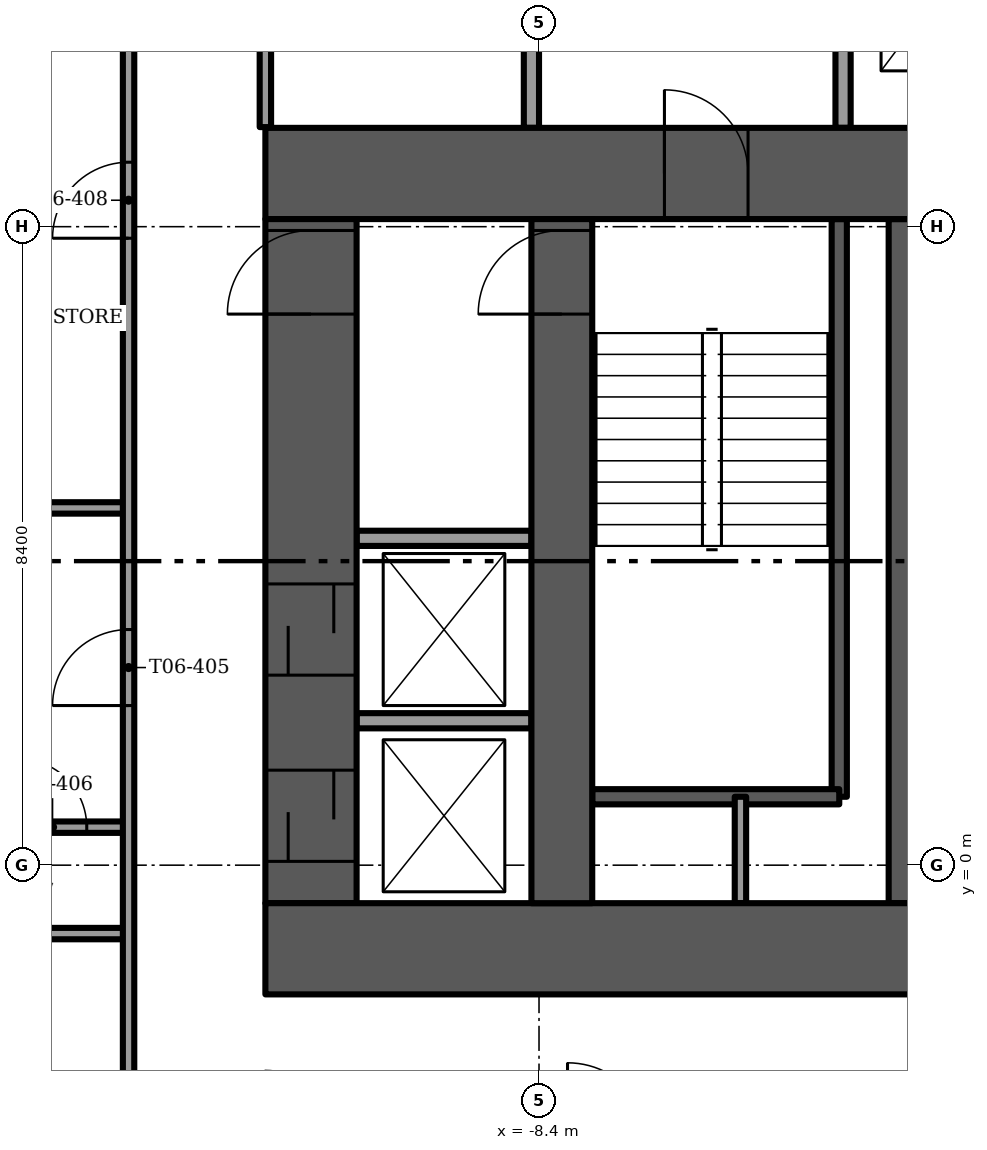
"""IFC4 building model, lengths in metres.
Left out: names, types, materials, properties, quantities, classifications, styles, units other than length and angle.
Written with IfcOpenShell. Run it as: python <this file> out.ifc"""

import sys

from ifc_helpers import new_model, si_unit, direction, frame, frame_2d, origin, place, context, subcontext, project, spatial, rectangle, extrude, element, fill, save


model = new_model("IFC4")
c1 = context("Model", 3, precision=1e-05, world=origin(), true_north=direction((0.0, 1.0)))
c2 = subcontext(c1, "Body", "Model", "MODEL_VIEW")
j1 = project(units=[si_unit("LENGTHUNIT", "METRE"), si_unit("PLANEANGLEUNIT", "RADIAN")], contexts=[c1])
p1 = place(None, origin())
s1 = spatial("IfcSite", under=j1, at=p1, CompositionType="ELEMENT")
p2 = place(p1, origin())
s2 = spatial("IfcBuilding", under=s1, at=p2, CompositionType="ELEMENT")
p3 = place(p2, frame((0.0, 0.0, 28.0)))
s3 = spatial("IfcBuildingStorey", under=s2, at=p3, CompositionType="ELEMENT", Elevation=28.0)
p4 = place(p3, frame((-12.0, -1.1, -0.3), z_axis=(0.0, 0.0, 1.0), x_axis=(1.0, 0.0, 0.0)))
e1 = element("IfcWall", 1, at=p4, inside=s3, PredefinedType="SHEAR", context=c2, shape_type="SweptSolid", body=[
    extrude(rectangle(XDim=24.0, YDim=1.2, at=frame_2d((12.0, 0.0))), origin(), (0.0, 0.0, 1.0), 3.75),
])
p5 = place(p4, frame((11.2, 0.0, 0.0)))
e2 = element("IfcOpeningElement", 2, at=p5, cuts=e1, PredefinedType="OPENING", context=c2, shape_type="SweptSolid", body=[
    extrude(rectangle(XDim=1.6, YDim=2.1, at=frame_2d((0.8, 1.05))), frame((0.0, 0.6, 0.0), z_axis=(0.0, -1.0, 0.0), x_axis=(1.0, 0.0, 0.0)), (0.0, 0.0, 1.0), 1.2),
])
p6 = place(p3, frame((-12.0, 9.1, -0.3), z_axis=(0.0, 0.0, 1.0), x_axis=(1.0, 0.0, 0.0)))
e3 = element("IfcWall", 3, at=p6, inside=s3, PredefinedType="SHEAR", context=c2, shape_type="SweptSolid", body=[
    extrude(rectangle(XDim=24.0, YDim=1.2, at=frame_2d((12.0, 0.0))), origin(), (0.0, 0.0, 1.0), 3.75),
])
p7 = place(p6, frame((11.2, 0.0, 0.0)))
e4 = element("IfcOpeningElement", 4, at=p7, cuts=e3, PredefinedType="OPENING", context=c2, shape_type="SweptSolid", body=[
    extrude(rectangle(XDim=1.6, YDim=2.1, at=frame_2d((0.8, 1.05))), frame((0.0, 0.6, 0.0), z_axis=(0.0, -1.0, 0.0), x_axis=(1.0, 0.0, 0.0)), (0.0, 0.0, 1.0), 1.2),
])
p8 = place(p6, frame((5.25, 0.0, 0.0)))
e5 = element("IfcOpeningElement", 5, at=p8, cuts=e3, PredefinedType="OPENING", context=c2, shape_type="SweptSolid", body=[
    extrude(rectangle(XDim=1.1, YDim=2.1, at=frame_2d((0.55, 1.05))), frame((0.0, 0.6, 0.0), z_axis=(0.0, -1.0, 0.0), x_axis=(1.0, 0.0, 0.0)), (0.0, 0.0, 1.0), 1.2),
])
p9 = place(p6, frame((17.65, 0.0, 0.0)))
e6 = element("IfcOpeningElement", 6, at=p9, cuts=e3, PredefinedType="OPENING", context=c2, shape_type="SweptSolid", body=[
    extrude(rectangle(XDim=1.1, YDim=2.1, at=frame_2d((0.55, 1.05))), frame((0.0, 0.6, 0.0), z_axis=(0.0, -1.0, 0.0), x_axis=(1.0, 0.0, 0.0)), (0.0, 0.0, 1.0), 1.2),
])
p10 = place(p3, frame((-8.1, -0.5, -0.3), z_axis=(0.0, 0.0, 1.0), x_axis=(0.0, 1.0, 0.0)))
e7 = element("IfcWall", 7, at=p10, inside=s3, PredefinedType="SHEAR", context=c2, shape_type="SweptSolid", body=[
    extrude(rectangle(XDim=9.0, YDim=0.8, at=frame_2d((4.5, 0.0))), origin(), (0.0, 0.0, 1.0), 3.75),
])
p11 = place(p10, frame((7.75, 0.0, 0.0)))
e8 = element("IfcOpeningElement", 8, at=p11, cuts=e7, PredefinedType="OPENING", context=c2, shape_type="SweptSolid", body=[
    extrude(rectangle(XDim=1.1, YDim=2.1, at=frame_2d((0.55, 1.05))), frame((0.0, 0.4, 0.0), z_axis=(0.0, -1.0, 0.0), x_axis=(1.0, 0.0, 0.0)), (0.0, 0.0, 1.0), 0.8),
])
p12 = place(p3, frame((-3.6, -0.5, -0.3), z_axis=(0.0, 0.0, 1.0), x_axis=(0.0, 1.0, 0.0)))
e9 = element("IfcWall", 9, at=p12, inside=s3, PredefinedType="SHEAR", context=c2, shape_type="SweptSolid", body=[
    extrude(rectangle(XDim=9.0, YDim=0.4, at=frame_2d((4.5, 0.0))), origin(), (0.0, 0.0, 1.0), 3.75),
])
p13 = place(p3, frame((-11.4, -0.5, -0.3), z_axis=(0.0, 0.0, 1.0), x_axis=(0.0, 1.0, 0.0)))
e10 = element("IfcWall", 10, at=p13, inside=s3, PredefinedType="SHEAR", context=c2, shape_type="SweptSolid", body=[
    extrude(rectangle(XDim=9.0, YDim=1.2, at=frame_2d((4.5, 0.0))), origin(), (0.0, 0.0, 1.0), 3.75),
])
p14 = place(p13, frame((7.75, 0.0, 0.0)))
e11 = element("IfcOpeningElement", 11, at=p14, cuts=e10, PredefinedType="OPENING", context=c2, shape_type="SweptSolid", body=[
    extrude(rectangle(XDim=1.1, YDim=2.1, at=frame_2d((0.55, 1.05))), frame((0.0, 0.6, 0.0), z_axis=(0.0, -1.0, 0.0), x_axis=(1.0, 0.0, 0.0)), (0.0, 0.0, 1.0), 1.2),
])
p15 = place(p13, frame((0.55, 0.0, 0.0)))
e12 = element("IfcOpeningElement", 12, at=p15, cuts=e10, PredefinedType="OPENING", context=c2, shape_type="SweptSolid", body=[
    extrude(rectangle(XDim=1.2, YDim=2.1, at=frame_2d((0.6, 1.05))), frame((0.0, 0.6, 0.0), z_axis=(0.0, -1.0, 0.0), x_axis=(1.0, 0.0, 0.0)), (0.0, 0.0, 1.0), 1.2),
])
p16 = place(p13, frame((3.0, 0.0, 0.0)))
e13 = element("IfcOpeningElement", 13, at=p16, cuts=e10, PredefinedType="OPENING", context=c2, shape_type="SweptSolid", body=[
    extrude(rectangle(XDim=1.2, YDim=2.1, at=frame_2d((0.6, 1.05))), frame((0.0, 0.6, 0.0), z_axis=(0.0, -1.0, 0.0), x_axis=(1.0, 0.0, 0.0)), (0.0, 0.0, 1.0), 1.2),
])
p17 = place(p3, frame((-9.56, 20.292, 0.0), z_axis=(0.0, 0.0, 1.0), x_axis=(-0.500000010132, -0.866025397935, 0.0)))
e14 = element("IfcWall", 14, at=p17, inside=s3, PredefinedType="SOLIDWALL", context=c2, shape_type="SweptSolid", body=[
    extrude(rectangle(XDim=22.817, YDim=0.15, at=frame_2d((11.408, 0.0))), origin(), (0.0, 0.0, 1.0), 3.45),
])
p18 = place(p17, frame((2.594, 0.0, 0.15)))
e15 = element("IfcOpeningElement", 15, at=p18, cuts=e14, PredefinedType="OPENING", context=c2, shape_type="SweptSolid", body=[
    extrude(rectangle(XDim=0.9, YDim=2.85, at=frame_2d((0.45, 1.425))), frame((0.0, 0.075, 0.0), z_axis=(0.0, -1.0, 0.0), x_axis=(1.0, 0.0, 0.0)), (0.0, 0.0, 1.0), 0.15),
])
p19 = place(p17, frame((3.825, 0.0, 0.15)))
e16 = element("IfcOpeningElement", 16, at=p19, cuts=e14, PredefinedType="OPENING", context=c2, shape_type="SweptSolid", body=[
    extrude(rectangle(XDim=1.5, YDim=2.85, at=frame_2d((0.75, 1.425))), frame((0.0, 0.075, 0.0), z_axis=(0.0, -1.0, 0.0), x_axis=(1.0, 0.0, 0.0)), (0.0, 0.0, 1.0), 0.15),
])
p20 = place(p17, frame((6.794, 0.0, 0.15)))
e17 = element("IfcOpeningElement", 17, at=p20, cuts=e14, PredefinedType="OPENING", context=c2, shape_type="SweptSolid", body=[
    extrude(rectangle(XDim=0.9, YDim=2.85, at=frame_2d((0.45, 1.425))), frame((0.0, 0.075, 0.0), z_axis=(0.0, -1.0, 0.0), x_axis=(1.0, 0.0, 0.0)), (0.0, 0.0, 1.0), 0.15),
])
p21 = place(p17, frame((8.894, 0.0, 0.15)))
e18 = element("IfcOpeningElement", 18, at=p21, cuts=e14, PredefinedType="OPENING", context=c2, shape_type="SweptSolid", body=[
    extrude(rectangle(XDim=1.5, YDim=2.85, at=frame_2d((0.75, 1.425))), frame((0.0, 0.075, 0.0), z_axis=(0.0, -1.0, 0.0), x_axis=(1.0, 0.0, 0.0)), (0.0, 0.0, 1.0), 0.15),
])
p22 = place(p17, frame((10.994, 0.0, 0.15)))
e19 = element("IfcOpeningElement", 19, at=p22, cuts=e14, PredefinedType="OPENING", context=c2, shape_type="SweptSolid", body=[
    extrude(rectangle(XDim=1.8, YDim=2.85, at=frame_2d((0.9, 1.425))), frame((0.0, 0.075, 0.0), z_axis=(0.0, -1.0, 0.0), x_axis=(1.0, 0.0, 0.0)), (0.0, 0.0, 1.0), 0.15),
])
p23 = place(p17, frame((13.094, 0.0, 0.15)))
e20 = element("IfcOpeningElement", 20, at=p23, cuts=e14, PredefinedType="OPENING", context=c2, shape_type="SweptSolid", body=[
    extrude(rectangle(XDim=1.5, YDim=2.85, at=frame_2d((0.75, 1.425))), frame((0.0, 0.075, 0.0), z_axis=(0.0, -1.0, 0.0), x_axis=(1.0, 0.0, 0.0)), (0.0, 0.0, 1.0), 0.15),
])
p24 = place(p17, frame((15.631, 0.0, 0.0)))
e21 = element("IfcOpeningElement", 21, at=p24, cuts=e14, PredefinedType="OPENING", context=c2, shape_type="SweptSolid", body=[
    extrude(rectangle(XDim=1.5, YDim=2.4, at=frame_2d((0.75, 1.2))), frame((0.0, 0.075, 0.0), z_axis=(0.0, -1.0, 0.0), x_axis=(1.0, 0.0, 0.0)), (0.0, 0.0, 1.0), 0.15),
])
p25 = place(p17, frame((0.44, 0.0, 0.15)))
e22 = element("IfcOpeningElement", 22, at=p25, cuts=e14, PredefinedType="OPENING", context=c2, shape_type="SweptSolid", body=[
    extrude(rectangle(XDim=0.9, YDim=2.73, at=frame_2d((0.45, 1.365))), frame((0.0, 0.075, 0.0), z_axis=(0.0, -1.0, 0.0), x_axis=(1.0, 0.0, 0.0)), (0.0, 0.0, 1.0), 0.15),
])
p26 = place(p17, frame((20.024, 0.0, 0.15)))
e23 = element("IfcOpeningElement", 23, at=p26, cuts=e14, PredefinedType="OPENING", context=c2, shape_type="SweptSolid", body=[
    extrude(rectangle(XDim=1.8, YDim=2.73, at=frame_2d((0.9, 1.365))), frame((0.0, 0.075, 0.0), z_axis=(0.0, -1.0, 0.0), x_axis=(1.0, 0.0, 0.0)), (0.0, 0.0, 1.0), 0.15),
])
p27 = place(p3, frame((-20.968, -0.532, 0.0), z_axis=(0.0, 0.0, 1.0), x_axis=(0.500003237297, -0.866023534722, 0.0)))
e24 = element("IfcWall", 24, at=p27, inside=s3, PredefinedType="SOLIDWALL", context=c2, shape_type="SweptSolid", body=[
    extrude(rectangle(XDim=20.046, YDim=0.15, at=frame_2d((10.023, 0.0))), origin(), (0.0, 0.0, 1.0), 3.45),
])
p28 = place(p27, frame((1.923, 0.0, 0.15)))
e25 = element("IfcOpeningElement", 25, at=p28, cuts=e24, PredefinedType="OPENING", context=c2, shape_type="SweptSolid", body=[
    extrude(rectangle(XDim=0.9, YDim=2.85, at=frame_2d((0.45, 1.425))), frame((0.0, 0.075, 0.0), z_axis=(0.0, -1.0, 0.0), x_axis=(1.0, 0.0, 0.0)), (0.0, 0.0, 1.0), 0.15),
])
p29 = place(p27, frame((6.123, 0.0, 0.15)))
e26 = element("IfcOpeningElement", 26, at=p29, cuts=e24, PredefinedType="OPENING", context=c2, shape_type="SweptSolid", body=[
    extrude(rectangle(XDim=1.8, YDim=2.85, at=frame_2d((0.9, 1.425))), frame((0.0, 0.075, 0.0), z_axis=(0.0, -1.0, 0.0), x_axis=(1.0, 0.0, 0.0)), (0.0, 0.0, 1.0), 0.15),
])
p30 = place(p27, frame((8.223, 0.0, 0.0)))
e27 = element("IfcOpeningElement", 27, at=p30, cuts=e24, PredefinedType="OPENING", context=c2, shape_type="SweptSolid", body=[
    extrude(rectangle(XDim=1.5, YDim=2.4, at=frame_2d((0.75, 1.2))), frame((0.0, 0.075, 0.0), z_axis=(0.0, -1.0, 0.0), x_axis=(1.0, 0.0, 0.0)), (0.0, 0.0, 1.0), 0.15),
])
p31 = place(p27, frame((10.323, 0.0, 0.15)))
e28 = element("IfcOpeningElement", 28, at=p31, cuts=e24, PredefinedType="OPENING", context=c2, shape_type="SweptSolid", body=[
    extrude(rectangle(XDim=1.8, YDim=2.85, at=frame_2d((0.9, 1.425))), frame((0.0, 0.075, 0.0), z_axis=(0.0, -1.0, 0.0), x_axis=(1.0, 0.0, 0.0)), (0.0, 0.0, 1.0), 0.15),
])
p32 = place(p27, frame((12.423, 0.0, 0.0)))
e29 = element("IfcOpeningElement", 29, at=p32, cuts=e24, PredefinedType="OPENING", context=c2, shape_type="SweptSolid", body=[
    extrude(rectangle(XDim=1.5, YDim=2.4, at=frame_2d((0.75, 1.2))), frame((0.0, 0.075, 0.0), z_axis=(0.0, -1.0, 0.0), x_axis=(1.0, 0.0, 0.0)), (0.0, 0.0, 1.0), 0.15),
])
p33 = place(p27, frame((14.523, 0.0, 0.15)))
e30 = element("IfcOpeningElement", 30, at=p33, cuts=e24, PredefinedType="OPENING", context=c2, shape_type="SweptSolid", body=[
    extrude(rectangle(XDim=1.8, YDim=2.85, at=frame_2d((0.9, 1.425))), frame((0.0, 0.075, 0.0), z_axis=(0.0, -1.0, 0.0), x_axis=(1.0, 0.0, 0.0)), (0.0, 0.0, 1.0), 0.15),
])
p34 = place(p27, frame((16.623, 0.0, 0.0)))
e31 = element("IfcOpeningElement", 31, at=p34, cuts=e24, PredefinedType="OPENING", context=c2, shape_type="SweptSolid", body=[
    extrude(rectangle(XDim=1.5, YDim=2.4, at=frame_2d((0.75, 1.2))), frame((0.0, 0.075, 0.0), z_axis=(0.0, -1.0, 0.0), x_axis=(1.0, 0.0, 0.0)), (0.0, 0.0, 1.0), 0.15),
])
p35 = place(p27, frame((0.311, 0.0, 0.15)))
e32 = element("IfcOpeningElement", 32, at=p35, cuts=e24, PredefinedType="OPENING", context=c2, shape_type="SweptSolid", body=[
    extrude(rectangle(XDim=0.9, YDim=2.73, at=frame_2d((0.45, 1.365))), frame((0.0, 0.075, 0.0), z_axis=(0.0, -1.0, 0.0), x_axis=(1.0, 0.0, 0.0)), (0.0, 0.0, 1.0), 0.15),
])
p36 = place(p27, frame((18.834, 0.0, 0.15)))
e33 = element("IfcOpeningElement", 33, at=p36, cuts=e24, PredefinedType="OPENING", context=c2, shape_type="SweptSolid", body=[
    extrude(rectangle(XDim=0.9, YDim=2.73, at=frame_2d((0.45, 1.365))), frame((0.0, 0.075, 0.0), z_axis=(0.0, -1.0, 0.0), x_axis=(1.0, 0.0, 0.0)), (0.0, 0.0, 1.0), 0.15),
])
p37 = place(p3, frame((-4.45, 0.9, -0.3), z_axis=(0.0, 0.0, 1.0), x_axis=(0.0, 1.0, 0.0)))
e34 = element("IfcWall", 34, at=p37, inside=s3, PredefinedType="SOLIDWALL", context=c2, shape_type="SweptSolid", body=[
    extrude(rectangle(XDim=7.6, YDim=0.2, at=frame_2d((3.8, 0.0))), origin(), (0.0, 0.0, 1.0), 3.75),
])
p38 = place(p3, frame((-7.7, 0.9, -0.3), z_axis=(0.0, 0.0, 1.0), x_axis=(1.0, 0.0, 0.0)))
e35 = element("IfcWall", 35, at=p38, inside=s3, PredefinedType="SOLIDWALL", context=c2, shape_type="SweptSolid", body=[
    extrude(rectangle(XDim=3.25, YDim=0.2, at=frame_2d((1.625, 0.0))), origin(), (0.0, 0.0, 1.0), 3.75),
])
p39 = place(p3, frame((-5.75, -0.5, 0.0), z_axis=(0.0, 0.0, 1.0), x_axis=(0.0, 1.0, 0.0)))
e36 = element("IfcWall", 36, at=p39, inside=s3, PredefinedType="PARTITIONING", context=c2, shape_type="SweptSolid", body=[
    extrude(rectangle(XDim=1.4, YDim=0.15, at=frame_2d((0.7, 0.0))), origin(), (0.0, 0.0, 1.0), 3.45),
])
p40 = place(p3, frame((-8.5, 9.7, 0.0), z_axis=(0.0, 0.0, 1.0), x_axis=(0.0, 1.0, 0.0)))
e37 = element("IfcWall", 37, at=p40, inside=s3, PredefinedType="PARTITIONING", context=c2, shape_type="SweptSolid", body=[
    extrude(rectangle(XDim=3.9, YDim=0.2, at=frame_2d((1.95, 0.0))), origin(), (0.0, 0.0, 1.0), 3.45),
])
p41 = place(p40, frame((1.35, 0.0, 0.0)))
e38 = element("IfcOpeningElement", 38, at=p41, cuts=e37, PredefinedType="OPENING", context=c2, shape_type="SweptSolid", body=[
    extrude(rectangle(XDim=1.2, YDim=2.1, at=frame_2d((0.6, 1.05))), frame((0.0, 0.1, 0.0), z_axis=(0.0, -1.0, 0.0), x_axis=(1.0, 0.0, 0.0)), (0.0, 0.0, 1.0), 0.2),
])
p42 = place(p3, frame((-4.4, 9.7, 0.0), z_axis=(0.0, 0.0, 1.0), x_axis=(0.0, 1.0, 0.0)))
e39 = element("IfcWall", 39, at=p42, inside=s3, PredefinedType="PARTITIONING", context=c2, shape_type="SweptSolid", body=[
    extrude(rectangle(XDim=3.9, YDim=0.2, at=frame_2d((1.95, 0.0))), origin(), (0.0, 0.0, 1.0), 3.45),
])
p43 = place(p42, frame((1.35, 0.0, 0.0)))
e40 = element("IfcOpeningElement", 40, at=p43, cuts=e39, PredefinedType="OPENING", context=c2, shape_type="SweptSolid", body=[
    extrude(rectangle(XDim=1.2, YDim=2.1, at=frame_2d((0.6, 1.05))), frame((0.0, 0.1, 0.0), z_axis=(0.0, -1.0, 0.0), x_axis=(1.0, 0.0, 0.0)), (0.0, 0.0, 1.0), 0.2),
])
for number, where, z_axis, x_axis in (
    (41, (-10.8, 1.9, 0.0), (0.0, 0.0, 1.0), (1.0, 0.0, 0.0)),
    (42, (-10.8, 4.3, 0.0), (0.0, 0.0, 1.0), (1.0, 0.0, 0.0)),
):
    element("IfcWall", number, at=place(p3, frame(where, z_axis=z_axis, x_axis=x_axis)), inside=s3, PredefinedType="PARTITIONING", context=c2, shape_type="SweptSolid", body=[
        extrude(rectangle(XDim=2.3, YDim=0.2, at=frame_2d((1.15, 0.0))), origin(), (0.0, 0.0, 1.0), 3.45),
    ])
p44 = place(p3, frame((-16.8, -0.9, 0.0), z_axis=(0.0, 0.0, 1.0), x_axis=(1.0, 0.0, 0.0)))
e43 = element("IfcWall", 43, at=p44, inside=s3, PredefinedType="PARTITIONING", context=c2, shape_type="SweptSolid", body=[
    extrude(rectangle(XDim=3.0, YDim=0.15, at=frame_2d((1.5, 0.0))), origin(), (0.0, 0.0, 1.0), 3.45),
])
p45 = place(p44, frame((1.1, 0.0, 0.0)))
e44 = element("IfcOpeningElement", 44, at=p45, cuts=e43, PredefinedType="OPENING", context=c2, shape_type="SweptSolid", body=[
    extrude(rectangle(XDim=0.8, YDim=2.1, at=frame_2d((0.4, 1.05))), frame((0.0, 0.075, 0.0), z_axis=(0.0, -1.0, 0.0), x_axis=(1.0, 0.0, 0.0)), (0.0, 0.0, 1.0), 0.15),
])
p46 = place(p3, frame((-20.986, 0.5, 0.0), z_axis=(0.0, 0.0, 1.0), x_axis=(1.0, 0.0, 0.0)))
e45 = element("IfcWall", 45, at=p46, inside=s3, PredefinedType="PARTITIONING", context=c2, shape_type="SweptSolid", body=[
    extrude(rectangle(XDim=7.186, YDim=0.15, at=frame_2d((3.593, 0.0))), origin(), (0.0, 0.0, 1.0), 3.45),
])
p47 = place(p46, frame((5.736, 0.0, 0.0)))
e46 = element("IfcOpeningElement", 46, at=p47, cuts=e45, PredefinedType="OPENING", context=c2, shape_type="SweptSolid", body=[
    extrude(rectangle(XDim=0.9, YDim=2.1, at=frame_2d((0.45, 1.05))), frame((0.0, 0.075, 0.0), z_axis=(0.0, -1.0, 0.0), x_axis=(1.0, 0.0, 0.0)), (0.0, 0.0, 1.0), 0.15),
])
p48 = place(p3, frame((-18.614, 4.7, 0.0), z_axis=(0.0, 0.0, 1.0), x_axis=(1.0, 0.0, 0.0)))
e47 = element("IfcWall", 47, at=p48, inside=s3, PredefinedType="PARTITIONING", context=c2, shape_type="SweptSolid", body=[
    extrude(rectangle(XDim=4.814, YDim=0.15, at=frame_2d((2.407, 0.0))), origin(), (0.0, 0.0, 1.0), 3.45),
])
p49 = place(p3, frame((-12.0, 9.71, 0.0), z_axis=(0.0, 0.0, 1.0), x_axis=(0.0, 1.0, 0.0)))
e48 = element("IfcWall", 48, at=p49, inside=s3, PredefinedType="PARTITIONING", context=c2, shape_type="SweptSolid", body=[
    extrude(rectangle(XDim=3.89, YDim=0.15, at=frame_2d((1.945, 0.0))), origin(), (0.0, 0.0, 1.0), 3.45),
])
p50 = place(p3, frame((-13.8, -3.7, 0.0), z_axis=(0.0, 0.0, 1.0), x_axis=(0.0, 1.0, 0.0)))
e49 = element("IfcWall", 49, at=p50, inside=s3, PredefinedType="PARTITIONING", context=c2, shape_type="SweptSolid", body=[
    extrude(rectangle(XDim=16.738, YDim=0.15, at=frame_2d((8.369, 0.0))), origin(), (0.0, 0.0, 1.0), 3.45),
])
p51 = place(p50, frame((5.8, 0.0, 0.0)))
e50 = element("IfcOpeningElement", 50, at=p51, cuts=e49, PredefinedType="OPENING", context=c2, shape_type="SweptSolid", body=[
    extrude(rectangle(XDim=1.0, YDim=2.1, at=frame_2d((0.5, 1.05))), frame((0.0, 0.075, 0.0), z_axis=(0.0, -1.0, 0.0), x_axis=(1.0, 0.0, 0.0)), (0.0, 0.0, 1.0), 0.15),
])
p52 = place(p50, frame((11.948, 0.0, 0.0)))
e51 = element("IfcOpeningElement", 51, at=p52, cuts=e49, PredefinedType="OPENING", context=c2, shape_type="SweptSolid", body=[
    extrude(rectangle(XDim=1.0, YDim=2.1, at=frame_2d((0.5, 1.05))), frame((0.0, 0.075, 0.0), z_axis=(0.0, -1.0, 0.0), x_axis=(1.0, 0.0, 0.0)), (0.0, 0.0, 1.0), 0.15),
])
p53 = place(p8, origin())
e52 = element("IfcDoor", 52, at=p53, inside=s3, OperationType="SINGLE_SWING_LEFT", PredefinedType="DOOR", context=c2, shape_type="SweptSolid", body=[
    extrude(rectangle(XDim=1.1, YDim=2.1, at=frame_2d((0.55, 1.05))), frame((0.0, 0.025, 0.0), z_axis=(0.0, -1.0, 0.0), x_axis=(1.0, 0.0, 0.0)), (0.0, 0.0, 1.0), 0.05),
])
fill(e5, e52)
p54 = place(p11, origin())
e53 = element("IfcDoor", 53, at=p54, inside=s3, OperationType="SINGLE_SWING_RIGHT", PredefinedType="DOOR", context=c2, shape_type="SweptSolid", body=[
    extrude(rectangle(XDim=1.1, YDim=2.1, at=frame_2d((0.55, 1.05))), frame((0.0, 0.025, 0.0), z_axis=(0.0, -1.0, 0.0), x_axis=(1.0, 0.0, 0.0)), (0.0, 0.0, 1.0), 0.05),
])
fill(e8, e53)
p55 = place(p14, origin())
e54 = element("IfcDoor", 54, at=p55, inside=s3, OperationType="SINGLE_SWING_LEFT", PredefinedType="DOOR", context=c2, shape_type="SweptSolid", body=[
    extrude(rectangle(XDim=1.1, YDim=2.1, at=frame_2d((0.55, 1.05))), frame((0.0, 0.025, 0.0), z_axis=(0.0, -1.0, 0.0), x_axis=(1.0, 0.0, 0.0)), (0.0, 0.0, 1.0), 0.05),
])
fill(e11, e54)
p56 = place(p15, origin())
e55 = element("IfcDoor", 55, at=p56, inside=s3, OperationType="SLIDING_TO_LEFT", PredefinedType="DOOR", context=c2, shape_type="SweptSolid", body=[
    extrude(rectangle(XDim=1.2, YDim=2.1, at=frame_2d((0.6, 1.05))), frame((0.0, 0.025, 0.0), z_axis=(0.0, -1.0, 0.0), x_axis=(1.0, 0.0, 0.0)), (0.0, 0.0, 1.0), 0.05),
])
fill(e12, e55)
p57 = place(p16, origin())
e56 = element("IfcDoor", 56, at=p57, inside=s3, OperationType="SLIDING_TO_LEFT", PredefinedType="DOOR", context=c2, shape_type="SweptSolid", body=[
    extrude(rectangle(XDim=1.2, YDim=2.1, at=frame_2d((0.6, 1.05))), frame((0.0, 0.025, 0.0), z_axis=(0.0, -1.0, 0.0), x_axis=(1.0, 0.0, 0.0)), (0.0, 0.0, 1.0), 0.05),
])
fill(e13, e56)
p58 = place(p51, origin())
e57 = element("IfcDoor", 57, at=p58, inside=s3, OperationType="SINGLE_SWING_RIGHT", PredefinedType="DOOR", context=c2, shape_type="SweptSolid", body=[
    extrude(rectangle(XDim=1.0, YDim=2.1, at=frame_2d((0.5, 1.05))), frame((0.0, 0.025, 0.0), z_axis=(0.0, -1.0, 0.0), x_axis=(1.0, 0.0, 0.0)), (0.0, 0.0, 1.0), 0.05),
])
fill(e50, e57)
p59 = place(p47, origin())
e58 = element("IfcDoor", 58, at=p59, inside=s3, OperationType="SINGLE_SWING_RIGHT", PredefinedType="DOOR", context=c2, shape_type="SweptSolid", body=[
    extrude(rectangle(XDim=0.9, YDim=2.1, at=frame_2d((0.45, 1.05))), frame((0.0, 0.025, 0.0), z_axis=(0.0, -1.0, 0.0), x_axis=(1.0, 0.0, 0.0)), (0.0, 0.0, 1.0), 0.05),
])
fill(e46, e58)
p60 = place(p52, origin())
e59 = element("IfcDoor", 59, at=p60, inside=s3, OperationType="SINGLE_SWING_LEFT", PredefinedType="DOOR", context=c2, shape_type="SweptSolid", body=[
    extrude(rectangle(XDim=1.0, YDim=2.1, at=frame_2d((0.5, 1.05))), frame((0.0, 0.025, 0.0), z_axis=(0.0, -1.0, 0.0), x_axis=(1.0, 0.0, 0.0)), (0.0, 0.0, 1.0), 0.05),
])
fill(e51, e59)
save(model, sys.argv[1])
